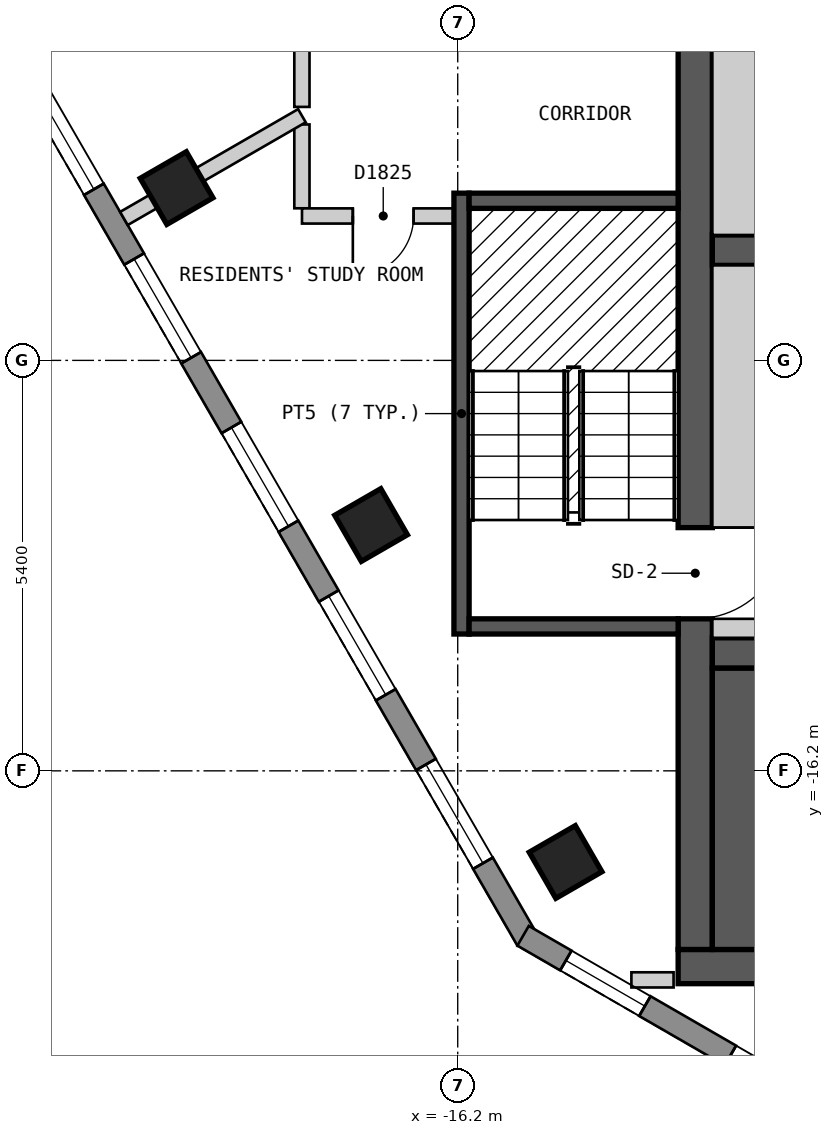
"""IFC4 building model, lengths in metres.
Left out: names, types, materials, properties, quantities, classifications, styles, units other than length and angle.
Written with IfcOpenShell. Run it as: python <this file> out.ifc"""

import sys

from ifc_helpers import new_model, si_unit, direction, frame, frame_2d, origin, origin_2d, place, context, subcontext, project, spatial, polyline, rectangle, outline, extrude, element, fill, save


model = new_model("IFC4")
c1 = context("Model", 3, precision=1e-05, world=origin(), true_north=direction((0.0, 1.0)))
c2 = subcontext(c1, "Body", "Model", "MODEL_VIEW")
j1 = project(units=[si_unit("LENGTHUNIT", "METRE"), si_unit("PLANEANGLEUNIT", "RADIAN")], contexts=[c1])
p1 = place(None, origin())
s1 = spatial("IfcSite", under=j1, at=p1, CompositionType="ELEMENT")
p2 = place(p1, origin())
s2 = spatial("IfcBuilding", under=s1, at=p2, CompositionType="ELEMENT")
p3 = place(p2, frame((0.0, 0.0, 208.8)))
s3 = spatial("IfcBuildingStorey", under=s2, at=p3, CompositionType="ELEMENT", Elevation=208.8)
for number, where, z_axis, x_axis in (
    (1, (-19.899, -8.533, 0.0), (0.0, 0.0, 1.0), (0.5, -0.866, 0.0)),
    (2, (-17.34, -12.966, 0.0), (0.0, 0.0, 1.0), (0.5, -0.866, 0.0)),
    (3, (-14.781, -17.399, 0.0), (0.0, 0.0, 1.0), (0.5, -0.866, 0.0)),
):
    element("IfcColumn", number, at=place(p3, frame(where, z_axis=z_axis, x_axis=x_axis)), inside=s3, PredefinedType="COLUMN", context=c2, shape_type="SweptSolid", body=[
        extrude(rectangle(XDim=0.7, YDim=0.7, at=origin_2d()), origin(), (0.0, 0.0, 1.0), 3.0),
    ])
p4 = place(p3, frame((-13.3, -18.775, 0.0), z_axis=(0.0, 0.0, 1.0), x_axis=(1.0, 0.0, 0.0)))
e4 = element("IfcWall", 4, at=p4, inside=s3, PredefinedType="SHEAR", context=c2, shape_type="SweptSolid", body=[
    extrude(rectangle(XDim=26.6, YDim=0.45, at=frame_2d((13.3, 0.0))), origin(), (0.0, 0.0, 1.0), 2.7),
])
p5 = place(p4, frame((10.25, 0.0, 0.0)))
e5 = element("IfcOpeningElement", 5, at=p5, cuts=e4, PredefinedType="OPENING", context=c2, shape_type="SweptSolid", body=[
    extrude(rectangle(XDim=0.9, YDim=2.1, at=frame_2d((0.45, 1.05))), frame((0.0, 0.235, 0.0), z_axis=(0.0, -1.0, 0.0), x_axis=(1.0, 0.0, 0.0)), (0.0, 0.0, 1.0), 0.47),
])
p6 = place(p3, frame((-13.075, -18.55, 0.0), z_axis=(0.0, 0.0, 1.0), x_axis=(0.0, 1.0, 0.0)))
e6 = element("IfcWall", 6, at=p6, inside=s3, PredefinedType="SHEAR", context=c2, shape_type="SweptSolid", body=[
    extrude(rectangle(XDim=13.1, YDim=0.45, at=frame_2d((6.55, 0.0))), origin(), (0.0, 0.0, 1.0), 2.7),
])
p7 = place(p6, frame((4.35, 0.0, 0.0)))
e7 = element("IfcOpeningElement", 7, at=p7, cuts=e6, PredefinedType="OPENING", context=c2, shape_type="SweptSolid", body=[
    extrude(rectangle(XDim=1.2, YDim=2.1, at=frame_2d((0.6, 1.05))), frame((0.0, 0.235, 0.0), z_axis=(0.0, -1.0, 0.0), x_axis=(1.0, 0.0, 0.0)), (0.0, 0.0, 1.0), 0.47),
])
p8 = place(p3, frame((-12.85, -14.65, 0.0), z_axis=(0.0, 0.0, 1.0), x_axis=(1.0, 0.0, 0.0)))
e8 = element("IfcWall", 8, at=p8, inside=s3, PredefinedType="SHEAR", context=c2, shape_type="SweptSolid", body=[
    extrude(rectangle(XDim=25.7, YDim=0.4, at=frame_2d((12.85, 0.0))), origin(), (0.0, 0.0, 1.0), 2.7),
])
p9 = place(p8, frame((2.05, 0.0, 0.0), z_axis=(0.0, 0.0, 1.0), x_axis=(-1.0, 0.0, 0.0)))
e9 = element("IfcOpeningElement", 9, at=p9, cuts=e8, PredefinedType="OPENING", context=c2, shape_type="SweptSolid", body=[
    extrude(rectangle(XDim=1.2, YDim=2.1, at=frame_2d((0.6, 1.05))), frame((0.0, 0.21, 0.0), z_axis=(0.0, -1.0, 0.0), x_axis=(1.0, 0.0, 0.0)), (0.0, 0.0, 1.0), 0.42),
])
p10 = place(p8, frame((24.9, 0.0, 0.0), z_axis=(0.0, 0.0, 1.0), x_axis=(-1.0, 0.0, 0.0)))
e10 = element("IfcOpeningElement", 10, at=p10, cuts=e8, PredefinedType="OPENING", context=c2, shape_type="SweptSolid", body=[
    extrude(rectangle(XDim=1.2, YDim=2.1, at=frame_2d((0.6, 1.05))), frame((0.0, 0.21, 0.0), z_axis=(0.0, -1.0, 0.0), x_axis=(1.0, 0.0, 0.0)), (0.0, 0.0, 1.0), 0.42),
])
p11 = place(p8, frame((10.0, 0.0, 0.0), z_axis=(0.0, 0.0, 1.0), x_axis=(-1.0, 0.0, 0.0)))
e11 = element("IfcOpeningElement", 11, at=p11, cuts=e8, PredefinedType="OPENING", context=c2, shape_type="SweptSolid", body=[
    extrude(rectangle(XDim=1.0, YDim=2.1, at=frame_2d((0.5, 1.05))), frame((0.0, 0.21, 0.0), z_axis=(0.0, -1.0, 0.0), x_axis=(1.0, 0.0, 0.0)), (0.0, 0.0, 1.0), 0.42),
])
p12 = place(p8, frame((16.4, 0.0, 0.0), z_axis=(0.0, 0.0, 1.0), x_axis=(-1.0, 0.0, 0.0)))
e12 = element("IfcOpeningElement", 12, at=p12, cuts=e8, PredefinedType="OPENING", context=c2, shape_type="SweptSolid", body=[
    extrude(rectangle(XDim=1.0, YDim=2.1, at=frame_2d((0.5, 1.05))), frame((0.0, 0.21, 0.0), z_axis=(0.0, -1.0, 0.0), x_axis=(1.0, 0.0, 0.0)), (0.0, 0.0, 1.0), 0.42),
])
p13 = place(p3, frame((-12.85, -9.35, 0.0), z_axis=(0.0, 0.0, 1.0), x_axis=(1.0, 0.0, 0.0)))
e13 = element("IfcWall", 13, at=p13, inside=s3, PredefinedType="SHEAR", context=c2, shape_type="SweptSolid", body=[
    extrude(rectangle(XDim=23.05, YDim=0.4, at=frame_2d((11.525, 0.0))), origin(), (0.0, 0.0, 1.0), 2.7),
])
p14 = place(p13, frame((1.45, 0.0, 0.0)))
e14 = element("IfcOpeningElement", 14, at=p14, cuts=e13, PredefinedType="OPENING", context=c2, shape_type="SweptSolid", body=[
    extrude(rectangle(XDim=1.1, YDim=2.1, at=frame_2d((0.55, 1.05))), frame((0.0, 0.21, 0.0), z_axis=(0.0, -1.0, 0.0), x_axis=(1.0, 0.0, 0.0)), (0.0, 0.0, 1.0), 0.42),
])
p15 = place(p13, frame((4.25, 0.0, 0.0)))
e15 = element("IfcOpeningElement", 15, at=p15, cuts=e13, PredefinedType="OPENING", context=c2, shape_type="SweptSolid", body=[
    extrude(rectangle(XDim=1.1, YDim=2.1, at=frame_2d((0.55, 1.05))), frame((0.0, 0.21, 0.0), z_axis=(0.0, -1.0, 0.0), x_axis=(1.0, 0.0, 0.0)), (0.0, 0.0, 1.0), 0.42),
])
p16 = place(p13, frame((7.05, 0.0, 0.0)))
e16 = element("IfcOpeningElement", 16, at=p16, cuts=e13, PredefinedType="OPENING", context=c2, shape_type="SweptSolid", body=[
    extrude(rectangle(XDim=1.1, YDim=2.1, at=frame_2d((0.55, 1.05))), frame((0.0, 0.21, 0.0), z_axis=(0.0, -1.0, 0.0), x_axis=(1.0, 0.0, 0.0)), (0.0, 0.0, 1.0), 0.42),
])
p17 = place(p13, frame((9.35, 0.0, 0.0)))
e17 = element("IfcOpeningElement", 17, at=p17, cuts=e13, PredefinedType="OPENING", context=c2, shape_type="SweptSolid", body=[
    extrude(rectangle(XDim=1.1, YDim=2.1, at=frame_2d((0.55, 1.05))), frame((0.0, 0.21, 0.0), z_axis=(0.0, -1.0, 0.0), x_axis=(1.0, 0.0, 0.0)), (0.0, 0.0, 1.0), 0.42),
])
p18 = place(p13, frame((11.65, 0.0, 0.0)))
e18 = element("IfcOpeningElement", 18, at=p18, cuts=e13, PredefinedType="OPENING", context=c2, shape_type="SweptSolid", body=[
    extrude(rectangle(XDim=1.1, YDim=2.1, at=frame_2d((0.55, 1.05))), frame((0.0, 0.21, 0.0), z_axis=(0.0, -1.0, 0.0), x_axis=(1.0, 0.0, 0.0)), (0.0, 0.0, 1.0), 0.42),
])
p19 = place(p13, frame((13.95, 0.0, 0.0)))
e19 = element("IfcOpeningElement", 19, at=p19, cuts=e13, PredefinedType="OPENING", context=c2, shape_type="SweptSolid", body=[
    extrude(rectangle(XDim=1.1, YDim=2.1, at=frame_2d((0.55, 1.05))), frame((0.0, 0.21, 0.0), z_axis=(0.0, -1.0, 0.0), x_axis=(1.0, 0.0, 0.0)), (0.0, 0.0, 1.0), 0.42),
])
p20 = place(p13, frame((16.25, 0.0, 0.0)))
e20 = element("IfcOpeningElement", 20, at=p20, cuts=e13, PredefinedType="OPENING", context=c2, shape_type="SweptSolid", body=[
    extrude(rectangle(XDim=1.1, YDim=2.1, at=frame_2d((0.55, 1.05))), frame((0.0, 0.21, 0.0), z_axis=(0.0, -1.0, 0.0), x_axis=(1.0, 0.0, 0.0)), (0.0, 0.0, 1.0), 0.42),
])
p21 = place(p13, frame((18.55, 0.0, 0.0)))
e21 = element("IfcOpeningElement", 21, at=p21, cuts=e13, PredefinedType="OPENING", context=c2, shape_type="SweptSolid", body=[
    extrude(rectangle(XDim=1.1, YDim=2.1, at=frame_2d((0.55, 1.05))), frame((0.0, 0.21, 0.0), z_axis=(0.0, -1.0, 0.0), x_axis=(1.0, 0.0, 0.0)), (0.0, 0.0, 1.0), 0.42),
])
p22 = place(p13, frame((20.95, 0.0, 0.0)))
e22 = element("IfcOpeningElement", 22, at=p22, cuts=e13, PredefinedType="OPENING", context=c2, shape_type="SweptSolid", body=[
    extrude(rectangle(XDim=1.1, YDim=2.1, at=frame_2d((0.55, 1.05))), frame((0.0, 0.21, 0.0), z_axis=(0.0, -1.0, 0.0), x_axis=(1.0, 0.0, 0.0)), (0.0, 0.0, 1.0), 0.42),
])
p23 = place(p3, frame((-23.599, -4.025, 0.0), z_axis=(0.0, 0.0, 1.0), x_axis=(0.500012653391, -0.866018098222, 0.0)))
e23 = element("IfcWall", 23, at=p23, inside=s3, PredefinedType="SOLIDWALL", context=c2, shape_type="SweptSolid", body=[
    extrude(outline(polyline([(0.0, -0.15), (16.628, -0.15), (16.548, 0.15), (0.08, 0.15), (0.0, -0.15)])), origin(), (0.0, 0.0, 1.0), 2.7),
])
p24 = place(p23, frame((1.164, 0.0, 0.15)))
e24 = element("IfcOpeningElement", 24, at=p24, cuts=e23, PredefinedType="OPENING", context=c2, shape_type="SweptSolid", body=[
    extrude(rectangle(XDim=1.5, YDim=2.1, at=frame_2d((0.75, 1.05))), frame((0.0, 0.16, 0.0), z_axis=(0.0, -1.0, 0.0), x_axis=(1.0, 0.0, 0.0)), (0.0, 0.0, 1.0), 0.32),
])
p25 = place(p23, frame((3.724, 0.0, 0.15)))
e25 = element("IfcOpeningElement", 25, at=p25, cuts=e23, PredefinedType="OPENING", context=c2, shape_type="SweptSolid", body=[
    extrude(rectangle(XDim=1.5, YDim=2.1, at=frame_2d((0.75, 1.05))), frame((0.0, 0.16, 0.0), z_axis=(0.0, -1.0, 0.0), x_axis=(1.0, 0.0, 0.0)), (0.0, 0.0, 1.0), 0.32),
])
p26 = place(p23, frame((6.283, 0.0, 0.15)))
e26 = element("IfcOpeningElement", 26, at=p26, cuts=e23, PredefinedType="OPENING", context=c2, shape_type="SweptSolid", body=[
    extrude(rectangle(XDim=1.5, YDim=2.1, at=frame_2d((0.75, 1.05))), frame((0.0, 0.16, 0.0), z_axis=(0.0, -1.0, 0.0), x_axis=(1.0, 0.0, 0.0)), (0.0, 0.0, 1.0), 0.32),
])
p27 = place(p23, frame((8.843, 0.0, 0.15)))
e27 = element("IfcOpeningElement", 27, at=p27, cuts=e23, PredefinedType="OPENING", context=c2, shape_type="SweptSolid", body=[
    extrude(rectangle(XDim=1.5, YDim=2.1, at=frame_2d((0.75, 1.05))), frame((0.0, 0.16, 0.0), z_axis=(0.0, -1.0, 0.0), x_axis=(1.0, 0.0, 0.0)), (0.0, 0.0, 1.0), 0.32),
])
p28 = place(p23, frame((11.403, 0.0, 0.15)))
e28 = element("IfcOpeningElement", 28, at=p28, cuts=e23, PredefinedType="OPENING", context=c2, shape_type="SweptSolid", body=[
    extrude(rectangle(XDim=1.5, YDim=2.1, at=frame_2d((0.75, 1.05))), frame((0.0, 0.16, 0.0), z_axis=(0.0, -1.0, 0.0), x_axis=(1.0, 0.0, 0.0)), (0.0, 0.0, 1.0), 0.32),
])
p29 = place(p23, frame((13.962, 0.0, 0.15)))
e29 = element("IfcOpeningElement", 29, at=p29, cuts=e23, PredefinedType="OPENING", context=c2, shape_type="SweptSolid", body=[
    extrude(rectangle(XDim=1.5, YDim=2.1, at=frame_2d((0.75, 1.05))), frame((0.0, 0.16, 0.0), z_axis=(0.0, -1.0, 0.0), x_axis=(1.0, 0.0, 0.0)), (0.0, 0.0, 1.0), 0.32),
])
p30 = place(p3, frame((-15.34, -18.37, 0.0), z_axis=(0.0, 0.0, 1.0), x_axis=(0.866022959057, -0.500004234368, 0.0)))
e30 = element("IfcWall", 30, at=p30, inside=s3, PredefinedType="SOLIDWALL", context=c2, shape_type="SweptSolid", body=[
    extrude(outline(polyline([(0.0, -0.15), (5.0, -0.15), (4.92, 0.15), (0.08, 0.15), (0.0, -0.15)])), origin(), (0.0, 0.0, 1.0), 2.7),
])
p31 = place(p30, frame((0.65, 0.0, 0.15)))
e31 = element("IfcOpeningElement", 31, at=p31, cuts=e30, PredefinedType="OPENING", context=c2, shape_type="SweptSolid", body=[
    extrude(rectangle(XDim=1.2, YDim=2.1, at=frame_2d((0.6, 1.05))), frame((0.0, 0.16, 0.0), z_axis=(0.0, -1.0, 0.0), x_axis=(1.0, 0.0, 0.0)), (0.0, 0.0, 1.0), 0.32),
])
p32 = place(p30, frame((3.15, 0.0, 0.15)))
e32 = element("IfcOpeningElement", 32, at=p32, cuts=e30, PredefinedType="OPENING", context=c2, shape_type="SweptSolid", body=[
    extrude(rectangle(XDim=1.2, YDim=2.1, at=frame_2d((0.6, 1.05))), frame((0.0, 0.16, 0.0), z_axis=(0.0, -1.0, 0.0), x_axis=(1.0, 0.0, 0.0)), (0.0, 0.0, 1.0), 0.32),
])
p33 = place(p3, frame((-18.25, -7.696, 0.0), z_axis=(0.0, 0.0, 1.0), x_axis=(0.0, -1.0, 0.0)))
e33 = element("IfcWall", 33, at=p33, inside=s3, PredefinedType="PARTITIONING", context=c2, shape_type="SweptSolid", body=[
    extrude(rectangle(XDim=1.103, YDim=0.2, at=frame_2d((0.552, 0.0))), origin(), (0.0, 0.0, 1.0), 2.7),
])
p34 = place(p3, frame((-18.249, -8.9, 0.0), z_axis=(0.0, 0.0, 1.0), x_axis=(1.0, 0.0, 0.0)))
e34 = element("IfcWall", 34, at=p34, inside=s3, PredefinedType="PARTITIONING", context=c2, shape_type="SweptSolid", body=[
    extrude(rectangle(XDim=2.199, YDim=0.2, at=frame_2d((1.1, 0.0))), origin(), (0.0, 0.0, 1.0), 2.7),
])
p35 = place(p34, frame((0.669, 0.0, 0.0)))
e35 = element("IfcOpeningElement", 35, at=p35, cuts=e34, PredefinedType="OPENING", context=c2, shape_type="SweptSolid", body=[
    extrude(rectangle(XDim=0.8, YDim=2.1, at=frame_2d((0.4, 1.05))), frame((0.0, 0.11, 0.0), z_axis=(0.0, -1.0, 0.0), x_axis=(1.0, 0.0, 0.0)), (0.0, 0.0, 1.0), 0.22),
])
p36 = place(p3, frame((-18.25, -7.465, 0.0), z_axis=(0.0, 0.0, 1.0), x_axis=(0.0, 1.0, 0.0)))
e36 = element("IfcWall", 36, at=p36, inside=s3, PredefinedType="PARTITIONING", context=c2, shape_type="SweptSolid", body=[
    extrude(rectangle(XDim=0.864, YDim=0.2, at=frame_2d((0.432, 0.0))), origin(), (0.0, 0.0, 1.0), 2.7),
])
p37 = place(p3, frame((-13.915, -18.95, 0.0), z_axis=(0.0, 0.0, 1.0), x_axis=(1.0, 0.0, 0.0)))
e37 = element("IfcWall", 37, at=p37, inside=s3, PredefinedType="PARTITIONING", context=c2, shape_type="SweptSolid", body=[
    extrude(rectangle(XDim=0.555, YDim=0.2, at=frame_2d((0.277, 0.0))), origin(), (0.0, 0.0, 1.0), 2.7),
])
p38 = place(p3, frame((-20.592, -8.933, 0.0), z_axis=(0.0, 0.0, 1.0), x_axis=(0.866045775131, 0.499964714133, 0.0)))
e38 = element("IfcWall", 38, at=p38, inside=s3, PredefinedType="PARTITIONING", context=c2, shape_type="SweptSolid", body=[
    extrude(rectangle(XDim=2.704, YDim=0.2, at=frame_2d((1.352, 0.0))), origin(), (0.0, 0.0, 1.0), 2.7),
])
p39 = place(p3, frame((-16.15, -14.4, 0.0), z_axis=(0.0, 0.0, 1.0), x_axis=(0.0, 1.0, 0.0)))
e39 = element("IfcWall", 39, at=p39, inside=s3, PredefinedType="SOLIDWALL", context=c2, shape_type="SweptSolid", body=[
    extrude(rectangle(XDim=5.8, YDim=0.2, at=frame_2d((2.9, 0.0))), origin(), (0.0, 0.0, 1.0), 2.7),
])
for number, where, z_axis, x_axis in (
    (40, (-16.05, -14.3, 0.0), (0.0, 0.0, 1.0), (1.0, 0.0, 0.0)),
    (41, (-16.05, -8.7, 0.0), (0.0, 0.0, 1.0), (1.0, 0.0, 0.0)),
):
    element("IfcWall", number, at=place(p3, frame(where, z_axis=z_axis, x_axis=x_axis)), inside=s3, PredefinedType="SOLIDWALL", context=c2, shape_type="SweptSolid", body=[
        extrude(rectangle(XDim=2.75, YDim=0.2, at=frame_2d((1.375, 0.0))), origin(), (0.0, 0.0, 1.0), 2.7),
    ])
p40 = place(p3, frame((-12.475, -18.55, 0.0), z_axis=(0.0, 0.0, 1.0), x_axis=(0.0, 1.0, 0.0)))
e42 = element("IfcWall", 42, at=p40, inside=s3, PredefinedType="SOLIDWALL", context=c2, shape_type="SweptSolid", body=[
    extrude(rectangle(XDim=3.7, YDim=0.75, at=frame_2d((1.85, 0.0))), origin(), (0.0, 0.0, 1.0), 2.7),
])
p41 = place(p3, frame((-12.85, -14.325, 0.0), z_axis=(0.0, 0.0, 1.0), x_axis=(1.0, 0.0, 0.0)))
e43 = element("IfcWall", 43, at=p41, inside=s3, PredefinedType="PARTITIONING", context=c2, shape_type="SweptSolid", body=[
    extrude(rectangle(XDim=0.75, YDim=0.25, at=frame_2d((0.375, 0.0))), origin(), (0.0, 0.0, 1.0), 2.7),
])
p42 = place(p3, frame((-12.475, -13.0, 0.0), z_axis=(0.0, 0.0, 1.0), x_axis=(0.0, 1.0, 0.0)))
e44 = element("IfcWall", 44, at=p42, inside=s3, PredefinedType="PARTITIONING", context=c2, shape_type="SweptSolid", body=[
    extrude(rectangle(XDim=3.45, YDim=0.75, at=frame_2d((1.725, 0.0))), origin(), (0.0, 0.0, 1.0), 2.7),
])
p43 = place(p3, frame((-12.475, -9.15, 0.0), z_axis=(0.0, 0.0, 1.0), x_axis=(0.0, 1.0, 0.0)))
e45 = element("IfcWall", 45, at=p43, inside=s3, PredefinedType="SOLIDWALL", context=c2, shape_type="SweptSolid", body=[
    extrude(rectangle(XDim=3.7, YDim=0.75, at=frame_2d((1.85, 0.0))), origin(), (0.0, 0.0, 1.0), 2.7),
])
p44 = place(p25, origin())
e46 = element("IfcWindow", 46, at=p44, inside=s3, PartitioningType="SINGLE_PANEL", PredefinedType="WINDOW", context=c2, shape_type="SweptSolid", body=[
    extrude(rectangle(XDim=1.5, YDim=2.1, at=frame_2d((0.75, 1.05))), frame((0.0, 0.03, 0.0), z_axis=(0.0, -1.0, 0.0), x_axis=(1.0, 0.0, 0.0)), (0.0, 0.0, 1.0), 0.06),
])
fill(e25, e46)
p45 = place(p26, origin())
e47 = element("IfcWindow", 47, at=p45, inside=s3, PartitioningType="SINGLE_PANEL", PredefinedType="WINDOW", context=c2, shape_type="SweptSolid", body=[
    extrude(rectangle(XDim=1.5, YDim=2.1, at=frame_2d((0.75, 1.05))), frame((0.0, 0.03, 0.0), z_axis=(0.0, -1.0, 0.0), x_axis=(1.0, 0.0, 0.0)), (0.0, 0.0, 1.0), 0.06),
])
fill(e26, e47)
p46 = place(p27, origin())
e48 = element("IfcWindow", 48, at=p46, inside=s3, PartitioningType="SINGLE_PANEL", PredefinedType="WINDOW", context=c2, shape_type="SweptSolid", body=[
    extrude(rectangle(XDim=1.5, YDim=2.1, at=frame_2d((0.75, 1.05))), frame((0.0, 0.03, 0.0), z_axis=(0.0, -1.0, 0.0), x_axis=(1.0, 0.0, 0.0)), (0.0, 0.0, 1.0), 0.06),
])
fill(e27, e48)
p47 = place(p28, origin())
e49 = element("IfcWindow", 49, at=p47, inside=s3, PartitioningType="SINGLE_PANEL", PredefinedType="WINDOW", context=c2, shape_type="SweptSolid", body=[
    extrude(rectangle(XDim=1.5, YDim=2.1, at=frame_2d((0.75, 1.05))), frame((0.0, 0.03, 0.0), z_axis=(0.0, -1.0, 0.0), x_axis=(1.0, 0.0, 0.0)), (0.0, 0.0, 1.0), 0.06),
])
fill(e28, e49)
p48 = place(p29, origin())
e50 = element("IfcWindow", 50, at=p48, inside=s3, PartitioningType="SINGLE_PANEL", PredefinedType="WINDOW", context=c2, shape_type="SweptSolid", body=[
    extrude(rectangle(XDim=1.5, YDim=2.1, at=frame_2d((0.75, 1.05))), frame((0.0, 0.03, 0.0), z_axis=(0.0, -1.0, 0.0), x_axis=(1.0, 0.0, 0.0)), (0.0, 0.0, 1.0), 0.06),
])
fill(e29, e50)
p49 = place(p31, origin())
e51 = element("IfcWindow", 51, at=p49, inside=s3, PartitioningType="SINGLE_PANEL", PredefinedType="WINDOW", context=c2, shape_type="SweptSolid", body=[
    extrude(rectangle(XDim=1.2, YDim=2.1, at=frame_2d((0.6, 1.05))), frame((0.0, 0.03, 0.0), z_axis=(0.0, -1.0, 0.0), x_axis=(1.0, 0.0, 0.0)), (0.0, 0.0, 1.0), 0.06),
])
fill(e31, e51)
p50 = place(p32, origin())
e52 = element("IfcWindow", 52, at=p50, inside=s3, PartitioningType="SINGLE_PANEL", PredefinedType="WINDOW", context=c2, shape_type="SweptSolid", body=[
    extrude(rectangle(XDim=1.2, YDim=2.1, at=frame_2d((0.6, 1.05))), frame((0.0, 0.03, 0.0), z_axis=(0.0, -1.0, 0.0), x_axis=(1.0, 0.0, 0.0)), (0.0, 0.0, 1.0), 0.06),
])
fill(e32, e52)
p51 = place(p35, origin())
e53 = element("IfcDoor", 53, at=p51, inside=s3, OperationType="SINGLE_SWING_LEFT", PredefinedType="DOOR", context=c2, shape_type="SweptSolid", body=[
    extrude(rectangle(XDim=0.8, YDim=2.1, at=frame_2d((0.4, 1.05))), frame((0.0, 0.025, 0.0), z_axis=(0.0, -1.0, 0.0), x_axis=(1.0, 0.0, 0.0)), (0.0, 0.0, 1.0), 0.05),
])
fill(e35, e53)
p52 = place(p7, origin())
e54 = element("IfcDoor", 54, at=p52, inside=s3, OperationType="SINGLE_SWING_RIGHT", PredefinedType="DOOR", context=c2, shape_type="SweptSolid", body=[
    extrude(rectangle(XDim=1.2, YDim=2.1, at=frame_2d((0.6, 1.05))), frame((0.0, 0.025, 0.0), z_axis=(0.0, -1.0, 0.0), x_axis=(1.0, 0.0, 0.0)), (0.0, 0.0, 1.0), 0.05),
])
fill(e7, e54)
save(model, sys.argv[1])
